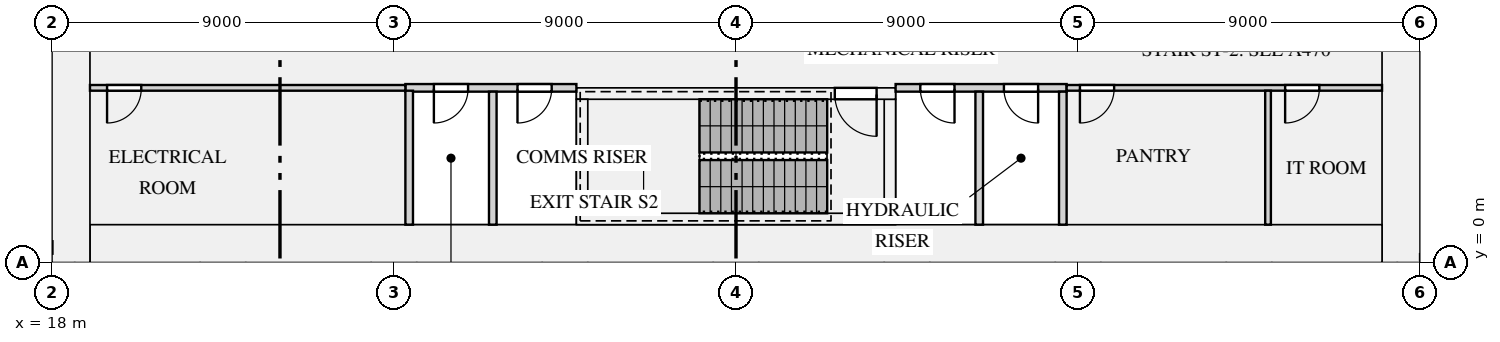
"""IFC4 building model, lengths in metres.
Left out: names, types, materials, properties, quantities, classifications, styles, units other than length and angle.
Written with IfcOpenShell. Run it as: python <this file> out.ifc"""

import sys

from ifc_helpers import new_model, si_unit, direction, frame, frame_2d, origin, place, context, subcontext, project, spatial, rectangle, extrude, element, fill, save


model = new_model("IFC4")
c1 = context("Model", 3, precision=1e-05, world=origin(), true_north=direction((0.0, 1.0)))
c2 = subcontext(c1, "Body", "Model", "MODEL_VIEW")
j1 = project(units=[si_unit("LENGTHUNIT", "METRE"), si_unit("PLANEANGLEUNIT", "RADIAN")], contexts=[c1])
p1 = place(None, origin())
s1 = spatial("IfcSite", under=j1, at=p1, CompositionType="ELEMENT")
p2 = place(p1, origin())
s2 = spatial("IfcBuilding", under=s1, at=p2, CompositionType="ELEMENT")
p3 = place(p2, frame((0.0, 0.0, 11.0)))
s3 = spatial("IfcBuildingStorey", under=s2, at=p3, CompositionType="ELEMENT", Elevation=11.0)
for number, where, z_axis, x_axis in (
    (1, (18.5, 0.0, 0.0), (0.0, 0.0, 1.0), (0.0, 1.0, 0.0)),
    (2, (53.5, 0.0, 0.0), (0.0, 0.0, 1.0), (0.0, 1.0, 0.0)),
):
    element("IfcWall", number, at=place(p3, frame(where, z_axis=z_axis, x_axis=x_axis)), inside=s3, PredefinedType="SHEAR", context=c2, shape_type="SweptSolid", body=[
        extrude(rectangle(XDim=12.5, YDim=1.0, at=frame_2d((6.25, 0.0))), origin(), (0.0, 0.0, 1.0), 4.5),
    ])
p4 = place(p3, frame((19.0, 0.5, 0.0), z_axis=(0.0, 0.0, 1.0), x_axis=(1.0, 0.0, 0.0)))
e3 = element("IfcWall", 3, at=p4, inside=s3, PredefinedType="SHEAR", context=c2, shape_type="SweptSolid", body=[
    extrude(rectangle(XDim=34.0, YDim=1.0, at=frame_2d((17.0, 0.0))), origin(), (0.0, 0.0, 1.0), 4.5),
])
p5 = place(p3, frame((31.8, 1.15, 0.0), z_axis=(0.0, 0.0, 1.0), x_axis=(1.0, 0.0, 0.0)))
e4 = element("IfcWall", 4, at=p5, inside=s3, PredefinedType="SHEAR", context=c2, shape_type="SweptSolid", body=[
    extrude(rectangle(XDim=8.4, YDim=0.3, at=frame_2d((4.2, 0.0))), origin(), (0.0, 0.0, 1.0), 4.5),
])
p6 = place(p3, frame((31.8, 4.45, 0.0), z_axis=(0.0, 0.0, 1.0), x_axis=(1.0, 0.0, 0.0)))
e5 = element("IfcWall", 5, at=p6, inside=s3, PredefinedType="SHEAR", context=c2, shape_type="SweptSolid", body=[
    extrude(rectangle(XDim=8.4, YDim=0.3, at=frame_2d((4.2, 0.0))), origin(), (0.0, 0.0, 1.0), 4.5),
])
p7 = place(p6, frame((6.8, 0.0, 0.0)))
e6 = element("IfcOpeningElement", 6, at=p7, cuts=e5, PredefinedType="OPENING", context=c2, shape_type="SweptSolid", body=[
    extrude(rectangle(XDim=1.1, YDim=2.1, at=frame_2d((0.55, 1.05))), frame((0.0, 0.16, 0.0), z_axis=(0.0, -1.0, 0.0), x_axis=(1.0, 0.0, 0.0)), (0.0, 0.0, 1.0), 0.32),
])
for number, where, z_axis, x_axis in (
    (7, (31.95, 1.3, 0.0), (0.0, 0.0, 1.0), (0.0, 1.0, 0.0)),
    (8, (40.05, 1.3, 0.0), (0.0, 0.0, 1.0), (0.0, 1.0, 0.0)),
):
    element("IfcWall", number, at=place(p3, frame(where, z_axis=z_axis, x_axis=x_axis)), inside=s3, PredefinedType="SHEAR", context=c2, shape_type="SweptSolid", body=[
        extrude(rectangle(XDim=3.0, YDim=0.3, at=frame_2d((1.5, 0.0))), origin(), (0.0, 0.0, 1.0), 4.5),
    ])
p8 = place(p3, frame((27.3, 4.6, 0.0), z_axis=(0.0, 0.0, 1.0), x_axis=(1.0, 0.0, 0.0)))
e9 = element("IfcWall", 9, at=p8, inside=s3, PredefinedType="PARTITIONING", context=c2, shape_type="SweptSolid", body=[
    extrude(rectangle(XDim=4.5, YDim=0.2, at=frame_2d((2.25, 0.0))), origin(), (0.0, 0.0, 1.0), 3.9),
])
p9 = place(p8, frame((0.75, 0.0, 0.0)))
e10 = element("IfcOpeningElement", 10, at=p9, cuts=e9, PredefinedType="OPENING", context=c2, shape_type="SweptSolid", body=[
    extrude(rectangle(XDim=0.9, YDim=2.1, at=frame_2d((0.45, 1.05))), frame((0.0, 0.11, 0.0), z_axis=(0.0, -1.0, 0.0), x_axis=(1.0, 0.0, 0.0)), (0.0, 0.0, 1.0), 0.22),
])
p10 = place(p8, frame((2.95, 0.0, 0.0)))
e11 = element("IfcOpeningElement", 11, at=p10, cuts=e9, PredefinedType="OPENING", context=c2, shape_type="SweptSolid", body=[
    extrude(rectangle(XDim=0.9, YDim=2.1, at=frame_2d((0.45, 1.05))), frame((0.0, 0.11, 0.0), z_axis=(0.0, -1.0, 0.0), x_axis=(1.0, 0.0, 0.0)), (0.0, 0.0, 1.0), 0.22),
])
p11 = place(p3, frame((40.2, 4.6, 0.0), z_axis=(0.0, 0.0, 1.0), x_axis=(1.0, 0.0, 0.0)))
e12 = element("IfcWall", 12, at=p11, inside=s3, PredefinedType="PARTITIONING", context=c2, shape_type="SweptSolid", body=[
    extrude(rectangle(XDim=4.5, YDim=0.2, at=frame_2d((2.25, 0.0))), origin(), (0.0, 0.0, 1.0), 3.9),
])
p12 = place(p11, frame((0.65, 0.0, 0.0)))
e13 = element("IfcOpeningElement", 13, at=p12, cuts=e12, PredefinedType="OPENING", context=c2, shape_type="SweptSolid", body=[
    extrude(rectangle(XDim=0.9, YDim=2.1, at=frame_2d((0.45, 1.05))), frame((0.0, 0.11, 0.0), z_axis=(0.0, -1.0, 0.0), x_axis=(1.0, 0.0, 0.0)), (0.0, 0.0, 1.0), 0.22),
])
p13 = place(p11, frame((2.85, 0.0, 0.0)))
e14 = element("IfcOpeningElement", 14, at=p13, cuts=e12, PredefinedType="OPENING", context=c2, shape_type="SweptSolid", body=[
    extrude(rectangle(XDim=0.9, YDim=2.1, at=frame_2d((0.45, 1.05))), frame((0.0, 0.11, 0.0), z_axis=(0.0, -1.0, 0.0), x_axis=(1.0, 0.0, 0.0)), (0.0, 0.0, 1.0), 0.22),
])
p14 = place(p3, frame((19.0, 4.6, 0.0), z_axis=(0.0, 0.0, 1.0), x_axis=(1.0, 0.0, 0.0)))
e15 = element("IfcWall", 15, at=p14, inside=s3, PredefinedType="PARTITIONING", context=c2, shape_type="SweptSolid", body=[
    extrude(rectangle(XDim=8.3, YDim=0.15, at=frame_2d((4.15, 0.0))), origin(), (0.0, 0.0, 1.0), 3.9),
])
p15 = place(p14, frame((0.45, 0.0, 0.0)))
e16 = element("IfcOpeningElement", 16, at=p15, cuts=e15, PredefinedType="OPENING", context=c2, shape_type="SweptSolid", body=[
    extrude(rectangle(XDim=0.9, YDim=2.1, at=frame_2d((0.45, 1.05))), frame((0.0, 0.085, 0.0), z_axis=(0.0, -1.0, 0.0), x_axis=(1.0, 0.0, 0.0)), (0.0, 0.0, 1.0), 0.17),
])
p16 = place(p3, frame((44.7, 4.6, 0.0), z_axis=(0.0, 0.0, 1.0), x_axis=(1.0, 0.0, 0.0)))
e17 = element("IfcWall", 17, at=p16, inside=s3, PredefinedType="PARTITIONING", context=c2, shape_type="SweptSolid", body=[
    extrude(rectangle(XDim=8.3, YDim=0.15, at=frame_2d((4.15, 0.0))), origin(), (0.0, 0.0, 1.0), 3.9),
])
p17 = place(p16, frame((0.35, 0.0, 0.0)))
e18 = element("IfcOpeningElement", 18, at=p17, cuts=e17, PredefinedType="OPENING", context=c2, shape_type="SweptSolid", body=[
    extrude(rectangle(XDim=0.9, YDim=2.1, at=frame_2d((0.45, 1.05))), frame((0.0, 0.085, 0.0), z_axis=(0.0, -1.0, 0.0), x_axis=(1.0, 0.0, 0.0)), (0.0, 0.0, 1.0), 0.17),
])
p18 = place(p16, frame((5.75, 0.0, 0.0)))
e19 = element("IfcOpeningElement", 19, at=p18, cuts=e17, PredefinedType="OPENING", context=c2, shape_type="SweptSolid", body=[
    extrude(rectangle(XDim=0.9, YDim=2.1, at=frame_2d((0.45, 1.05))), frame((0.0, 0.085, 0.0), z_axis=(0.0, -1.0, 0.0), x_axis=(1.0, 0.0, 0.0)), (0.0, 0.0, 1.0), 0.17),
])
p19 = place(p3, frame((27.4, 1.0, 0.0), z_axis=(0.0, 0.0, 1.0), x_axis=(0.0, 1.0, 0.0)))
e20 = element("IfcWall", 20, at=p19, inside=s3, PredefinedType="PARTITIONING", context=c2, shape_type="SweptSolid", body=[
    extrude(rectangle(XDim=3.525, YDim=0.2, at=frame_2d((1.762, 0.0))), origin(), (0.0, 0.0, 1.0), 3.9),
])
for number, where, z_axis, x_axis in (
    (21, (29.6, 1.0, 0.0), (0.0, 0.0, 1.0), (0.0, 1.0, 0.0)),
    (22, (42.4, 1.0, 0.0), (0.0, 0.0, 1.0), (0.0, 1.0, 0.0)),
    (23, (44.6, 1.0, 0.0), (0.0, 0.0, 1.0), (0.0, 1.0, 0.0)),
):
    element("IfcWall", number, at=place(p3, frame(where, z_axis=z_axis, x_axis=x_axis)), inside=s3, PredefinedType="PARTITIONING", context=c2, shape_type="SweptSolid", body=[
        extrude(rectangle(XDim=3.5, YDim=0.2, at=frame_2d((1.75, 0.0))), origin(), (0.0, 0.0, 1.0), 3.9),
    ])
p20 = place(p3, frame((50.0, 1.0, 0.0), z_axis=(0.0, 0.0, 1.0), x_axis=(0.0, 1.0, 0.0)))
e24 = element("IfcWall", 24, at=p20, inside=s3, PredefinedType="PARTITIONING", context=c2, shape_type="SweptSolid", body=[
    extrude(rectangle(XDim=3.525, YDim=0.15, at=frame_2d((1.762, 0.0))), origin(), (0.0, 0.0, 1.0), 3.9),
])
p21 = place(p7, frame((1.1, 0.0, 0.0), z_axis=(0.0, 0.0, 1.0), x_axis=(-1.0, 0.0, 0.0)))
e25 = element("IfcDoor", 25, at=p21, inside=s3, OperationType="SINGLE_SWING_LEFT", PredefinedType="DOOR", context=c2, shape_type="SweptSolid", body=[
    extrude(rectangle(XDim=1.1, YDim=2.1, at=frame_2d((0.55, 1.05))), frame((0.0, 0.025, 0.0), z_axis=(0.0, -1.0, 0.0), x_axis=(1.0, 0.0, 0.0)), (0.0, 0.0, 1.0), 0.05),
])
fill(e6, e25)
p22 = place(p15, frame((0.9, 0.0, 0.0), z_axis=(0.0, 0.0, 1.0), x_axis=(-1.0, 0.0, 0.0)))
e26 = element("IfcDoor", 26, at=p22, inside=s3, OperationType="SINGLE_SWING_RIGHT", PredefinedType="DOOR", context=c2, shape_type="SweptSolid", body=[
    extrude(rectangle(XDim=0.9, YDim=2.1, at=frame_2d((0.45, 1.05))), frame((0.0, 0.025, 0.0), z_axis=(0.0, -1.0, 0.0), x_axis=(1.0, 0.0, 0.0)), (0.0, 0.0, 1.0), 0.05),
])
fill(e16, e26)
p23 = place(p17, frame((0.9, 0.0, 0.0), z_axis=(0.0, 0.0, 1.0), x_axis=(-1.0, 0.0, 0.0)))
e27 = element("IfcDoor", 27, at=p23, inside=s3, OperationType="SINGLE_SWING_RIGHT", PredefinedType="DOOR", context=c2, shape_type="SweptSolid", body=[
    extrude(rectangle(XDim=0.9, YDim=2.1, at=frame_2d((0.45, 1.05))), frame((0.0, 0.025, 0.0), z_axis=(0.0, -1.0, 0.0), x_axis=(1.0, 0.0, 0.0)), (0.0, 0.0, 1.0), 0.05),
])
fill(e18, e27)
p24 = place(p18, frame((0.9, 0.0, 0.0), z_axis=(0.0, 0.0, 1.0), x_axis=(-1.0, 0.0, 0.0)))
e28 = element("IfcDoor", 28, at=p24, inside=s3, OperationType="SINGLE_SWING_RIGHT", PredefinedType="DOOR", context=c2, shape_type="SweptSolid", body=[
    extrude(rectangle(XDim=0.9, YDim=2.1, at=frame_2d((0.45, 1.05))), frame((0.0, 0.025, 0.0), z_axis=(0.0, -1.0, 0.0), x_axis=(1.0, 0.0, 0.0)), (0.0, 0.0, 1.0), 0.05),
])
fill(e19, e28)
p25 = place(p9, frame((0.9, 0.0, 0.0), z_axis=(0.0, 0.0, 1.0), x_axis=(-1.0, 0.0, 0.0)))
e29 = element("IfcDoor", 29, at=p25, inside=s3, OperationType="SINGLE_SWING_RIGHT", PredefinedType="DOOR", context=c2, shape_type="SweptSolid", body=[
    extrude(rectangle(XDim=0.9, YDim=2.1, at=frame_2d((0.45, 1.05))), frame((0.0, 0.025, 0.0), z_axis=(0.0, -1.0, 0.0), x_axis=(1.0, 0.0, 0.0)), (0.0, 0.0, 1.0), 0.05),
])
fill(e10, e29)
p26 = place(p10, frame((0.9, 0.0, 0.0), z_axis=(0.0, 0.0, 1.0), x_axis=(-1.0, 0.0, 0.0)))
e30 = element("IfcDoor", 30, at=p26, inside=s3, OperationType="SINGLE_SWING_RIGHT", PredefinedType="DOOR", context=c2, shape_type="SweptSolid", body=[
    extrude(rectangle(XDim=0.9, YDim=2.1, at=frame_2d((0.45, 1.05))), frame((0.0, 0.025, 0.0), z_axis=(0.0, -1.0, 0.0), x_axis=(1.0, 0.0, 0.0)), (0.0, 0.0, 1.0), 0.05),
])
fill(e11, e30)
p27 = place(p12, frame((0.9, 0.0, 0.0), z_axis=(0.0, 0.0, 1.0), x_axis=(-1.0, 0.0, 0.0)))
e31 = element("IfcDoor", 31, at=p27, inside=s3, OperationType="SINGLE_SWING_LEFT", PredefinedType="DOOR", context=c2, shape_type="SweptSolid", body=[
    extrude(rectangle(XDim=0.9, YDim=2.1, at=frame_2d((0.45, 1.05))), frame((0.0, 0.025, 0.0), z_axis=(0.0, -1.0, 0.0), x_axis=(1.0, 0.0, 0.0)), (0.0, 0.0, 1.0), 0.05),
])
fill(e13, e31)
p28 = place(p13, frame((0.9, 0.0, 0.0), z_axis=(0.0, 0.0, 1.0), x_axis=(-1.0, 0.0, 0.0)))
e32 = element("IfcDoor", 32, at=p28, inside=s3, OperationType="SINGLE_SWING_LEFT", PredefinedType="DOOR", context=c2, shape_type="SweptSolid", body=[
    extrude(rectangle(XDim=0.9, YDim=2.1, at=frame_2d((0.45, 1.05))), frame((0.0, 0.025, 0.0), z_axis=(0.0, -1.0, 0.0), x_axis=(1.0, 0.0, 0.0)), (0.0, 0.0, 1.0), 0.05),
])
fill(e14, e32)
save(model, sys.argv[1])
